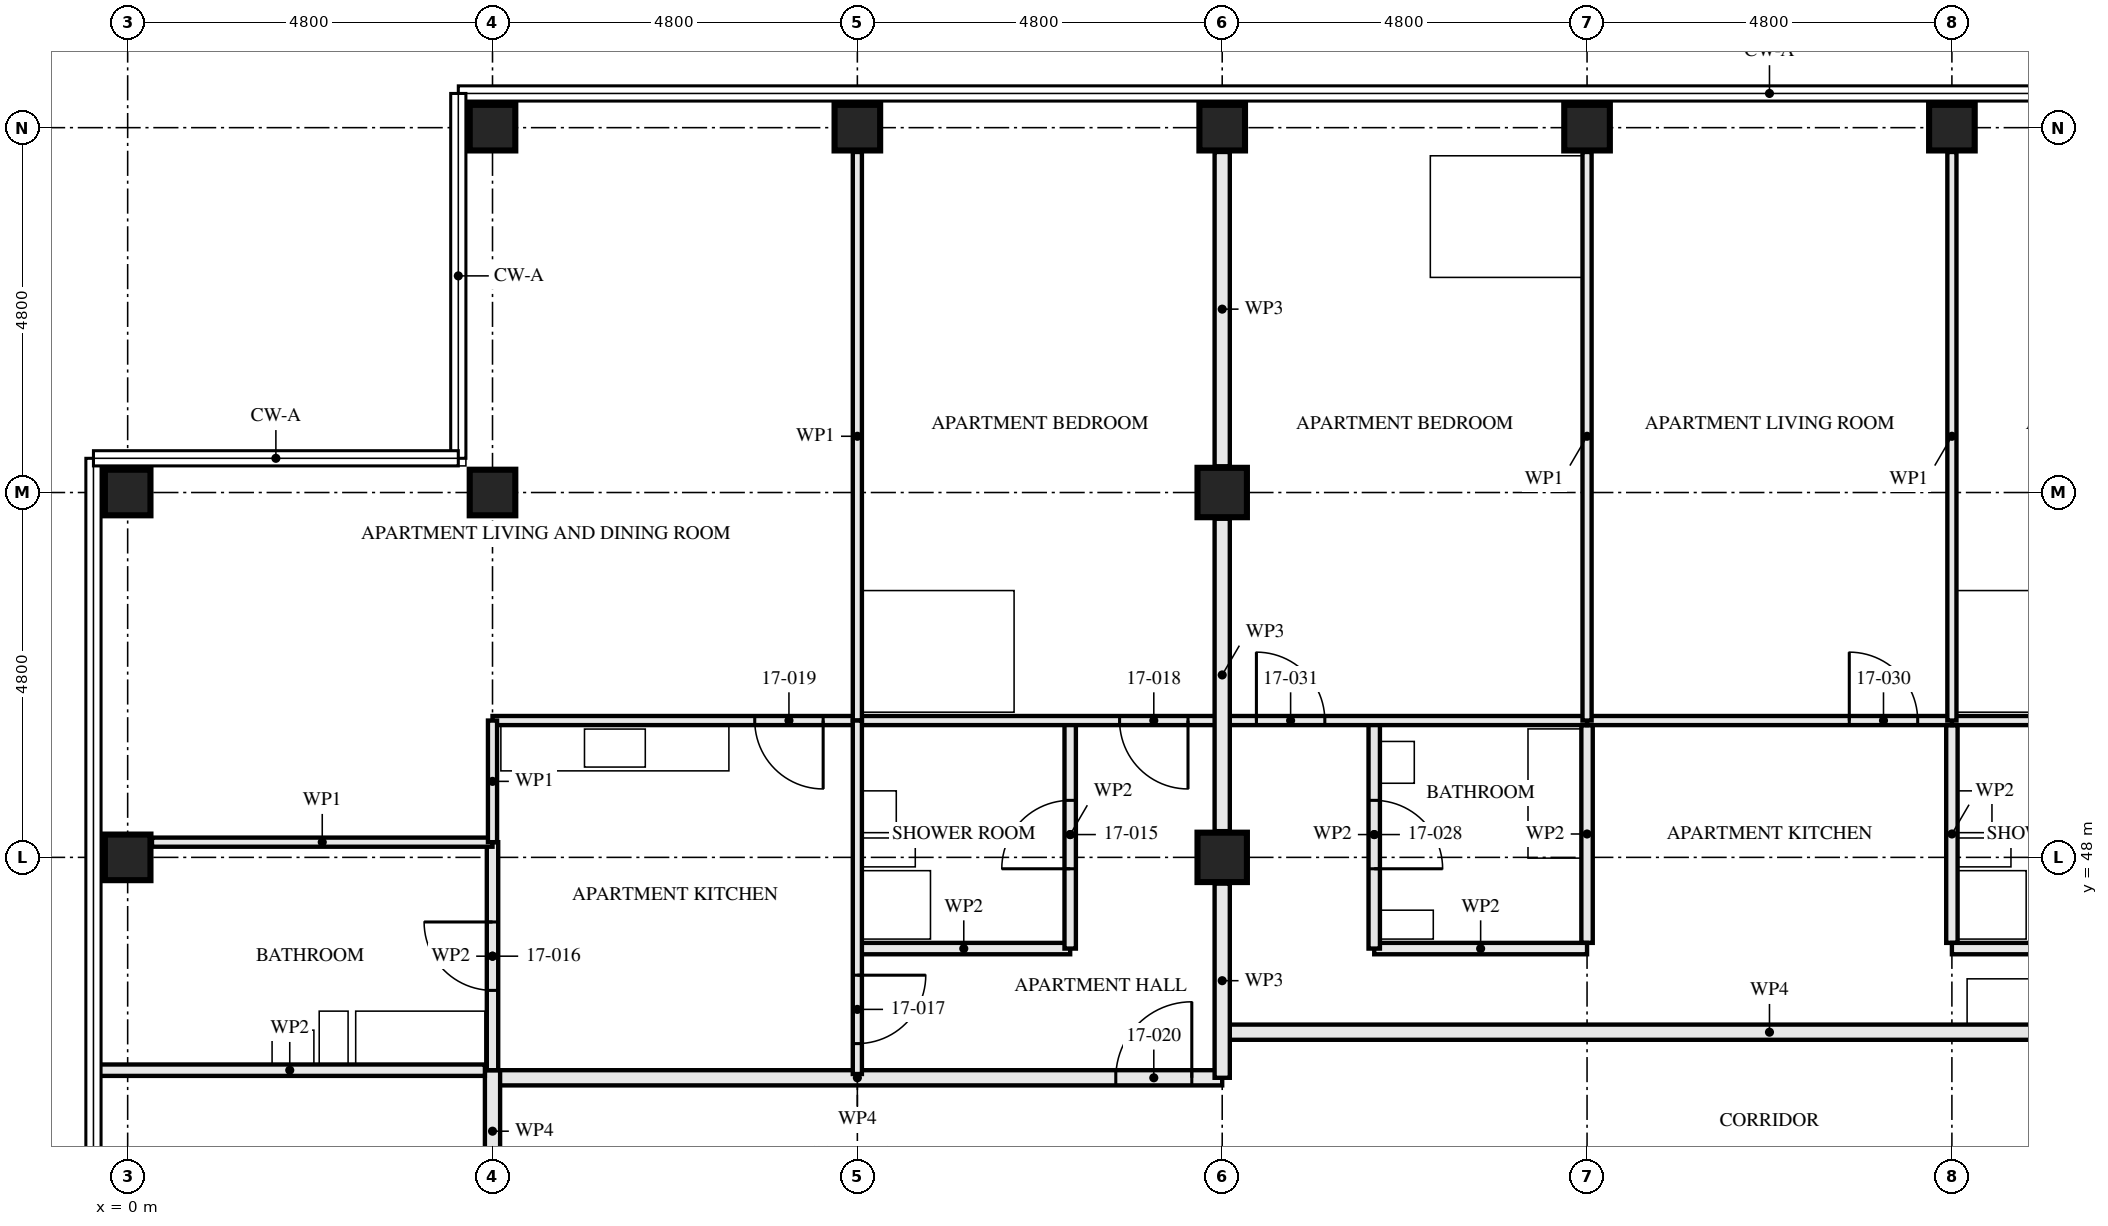
"""IFC4 building model, lengths in metres.
Left out: names, types, materials, properties, quantities, classifications, styles, units other than length and angle.
Written with IfcOpenShell. Run it as: python <this file> out.ifc"""

import sys

from ifc_helpers import new_model, si_unit, direction, frame, frame_2d, origin, origin_2d, place, context, subcontext, project, spatial, rectangle, hollow_rectangle, extrude, element, fill, save


model = new_model("IFC4")
c1 = context("Model", 3, precision=1e-05, world=origin(), true_north=direction((0.0, 1.0)))
c2 = subcontext(c1, "Body", "Model", "MODEL_VIEW")
j1 = project(units=[si_unit("LENGTHUNIT", "METRE"), si_unit("PLANEANGLEUNIT", "RADIAN")], contexts=[c1])
p1 = place(None, origin())
s1 = spatial("IfcSite", under=j1, at=p1, CompositionType="ELEMENT")
p2 = place(p1, origin())
s2 = spatial("IfcBuilding", under=s1, at=p2, CompositionType="ELEMENT")
p3 = place(p2, frame((0.0, 0.0, 65.5)))
s3 = spatial("IfcBuildingStorey", under=s2, at=p3, CompositionType="ELEMENT", Elevation=65.5)
for number, where, z_axis, x_axis in (
    (1, (0.0, 48.0, 0.0), (0.0, 0.0, 1.0), (1.0, 0.0, 0.0)),
    (2, (0.0, 52.8, 0.0), (0.0, 0.0, 1.0), (0.0, 1.0, 0.0)),
    (3, (4.8, 52.8, 0.0), (0.0, 0.0, 1.0), (0.0, 1.0, 0.0)),
    (4, (4.8, 57.6, 0.0), (0.0, 0.0, 1.0), (0.0, 1.0, 0.0)),
    (5, (9.6, 57.6, 0.0), (0.0, 0.0, 1.0), (0.0, 1.0, 0.0)),
):
    element("IfcColumn", number, at=place(p3, frame(where, z_axis=z_axis, x_axis=x_axis)), inside=s3, PredefinedType="COLUMN", context=c2, shape_type="SweptSolid", body=[
        extrude(hollow_rectangle(XDim=0.6, YDim=0.6, WallThickness=0.08, at=origin_2d()), origin(), (0.0, 0.0, 1.0), 3.5),
    ])
for number, where, z_axis, x_axis in (
    (6, (14.4, 48.0, 0.0), (0.0, 0.0, 1.0), (1.0, 0.0, 0.0)),
    (7, (14.4, 52.8, 0.0), (0.0, 0.0, 1.0), (1.0, 0.0, 0.0)),
):
    element("IfcColumn", number, at=place(p3, frame(where, z_axis=z_axis, x_axis=x_axis)), inside=s3, PredefinedType="COLUMN", context=c2, shape_type="SweptSolid", body=[
        extrude(hollow_rectangle(XDim=0.65, YDim=0.65, WallThickness=0.05, at=origin_2d()), origin(), (0.0, 0.0, 1.0), 3.5),
    ])
for number, where, z_axis, x_axis in (
    (8, (14.4, 57.6, 0.0), (0.0, 0.0, 1.0), (0.0, 1.0, 0.0)),
    (9, (19.2, 57.6, 0.0), (0.0, 0.0, 1.0), (0.0, 1.0, 0.0)),
    (10, (24.0, 57.6, 0.0), (0.0, 0.0, 1.0), (0.0, 1.0, 0.0)),
):
    element("IfcColumn", number, at=place(p3, frame(where, z_axis=z_axis, x_axis=x_axis)), inside=s3, PredefinedType="COLUMN", context=c2, shape_type="SweptSolid", body=[
        extrude(hollow_rectangle(XDim=0.6, YDim=0.6, WallThickness=0.08, at=origin_2d()), origin(), (0.0, 0.0, 1.0), 3.5),
    ])
p4 = place(p3, frame((12.4, 49.8, 0.0), z_axis=(0.0, 0.0, 1.0), x_axis=(0.0, -1.0, 0.0)))
e11 = element("IfcWall", 11, at=p4, inside=s3, PredefinedType="PARTITIONING", context=c2, shape_type="SweptSolid", body=[
    extrude(rectangle(XDim=3.0, YDim=0.15, at=frame_2d((1.5, 0.0))), origin(), (0.0, 0.0, 1.0), 2.55),
])
p5 = place(p4, frame((1.05, 0.0, 0.0)))
e12 = element("IfcOpeningElement", 12, at=p5, cuts=e11, PredefinedType="OPENING", context=c2, shape_type="SweptSolid", body=[
    extrude(rectangle(XDim=0.9, YDim=2.1, at=frame_2d((0.45, 1.05))), frame((0.0, 0.085, 0.0), z_axis=(0.0, -1.0, 0.0), x_axis=(1.0, 0.0, 0.0)), (0.0, 0.0, 1.0), 0.171),
])
p6 = place(p3, frame((12.4, 46.8, 0.0), z_axis=(0.0, 0.0, 1.0), x_axis=(-1.0, 0.0, 0.0)))
e13 = element("IfcWall", 13, at=p6, inside=s3, PredefinedType="PARTITIONING", context=c2, shape_type="SweptSolid", body=[
    extrude(rectangle(XDim=2.8, YDim=0.15, at=frame_2d((1.4, 0.0))), origin(), (0.0, 0.0, 1.0), 3.33),
])
p7 = place(p3, frame((4.8, 48.2, 0.0), z_axis=(0.0, 0.0, 1.0), x_axis=(0.0, -1.0, 0.0)))
e14 = element("IfcWall", 14, at=p7, inside=s3, PredefinedType="PARTITIONING", context=c2, shape_type="SweptSolid", body=[
    extrude(rectangle(XDim=3.0, YDim=0.15, at=frame_2d((1.5, 0.0))), origin(), (0.0, 0.0, 1.0), 2.55),
])
p8 = place(p7, frame((1.05, 0.0, 0.0)))
e15 = element("IfcOpeningElement", 15, at=p8, cuts=e14, PredefinedType="OPENING", context=c2, shape_type="SweptSolid", body=[
    extrude(rectangle(XDim=0.9, YDim=2.1, at=frame_2d((0.45, 1.05))), frame((0.0, 0.085, 0.0), z_axis=(0.0, -1.0, 0.0), x_axis=(1.0, 0.0, 0.0)), (0.0, 0.0, 1.0), 0.171),
])
p9 = place(p3, frame((9.6, 49.8, 0.0), z_axis=(0.0, 0.0, 1.0), x_axis=(0.0, -1.0, 0.0)))
e16 = element("IfcWall", 16, at=p9, inside=s3, PredefinedType="PARTITIONING", context=c2, shape_type="SweptSolid", body=[
    extrude(rectangle(XDim=4.65, YDim=0.12, at=frame_2d((2.325, 0.0))), origin(), (0.0, 0.0, 1.0), 2.55),
])
p10 = place(p9, frame((3.35, 0.0, 0.0)))
e17 = element("IfcOpeningElement", 17, at=p10, cuts=e16, PredefinedType="OPENING", context=c2, shape_type="SweptSolid", body=[
    extrude(rectangle(XDim=0.9, YDim=2.1, at=frame_2d((0.45, 1.05))), frame((0.0, 0.071, 0.0), z_axis=(0.0, -1.0, 0.0), x_axis=(1.0, 0.0, 0.0)), (0.0, 0.0, 1.0), 0.141),
])
p11 = place(p3, frame((14.4, 49.8, 0.0), z_axis=(0.0, 0.0, 1.0), x_axis=(-1.0, 0.0, 0.0)))
e18 = element("IfcWall", 18, at=p11, inside=s3, PredefinedType="PARTITIONING", context=c2, shape_type="SweptSolid", body=[
    extrude(rectangle(XDim=4.8, YDim=0.12, at=frame_2d((2.4, 0.0))), origin(), (0.0, 0.0, 1.0), 3.33),
])
p12 = place(p11, frame((0.45, 0.0, 0.0)))
e19 = element("IfcOpeningElement", 19, at=p12, cuts=e18, PredefinedType="OPENING", context=c2, shape_type="SweptSolid", body=[
    extrude(rectangle(XDim=0.9, YDim=2.1, at=frame_2d((0.45, 1.05))), frame((0.0, 0.071, 0.0), z_axis=(0.0, -1.0, 0.0), x_axis=(1.0, 0.0, 0.0)), (0.0, 0.0, 1.0), 0.141),
])
p13 = place(p3, frame((9.6, 49.8, 0.0), z_axis=(0.0, 0.0, 1.0), x_axis=(-1.0, 0.0, 0.0)))
e20 = element("IfcWall", 20, at=p13, inside=s3, PredefinedType="PARTITIONING", context=c2, shape_type="SweptSolid", body=[
    extrude(rectangle(XDim=4.8, YDim=0.12, at=frame_2d((2.4, 0.0))), origin(), (0.0, 0.0, 1.0), 3.33),
])
p14 = place(p13, frame((0.45, 0.0, 0.0)))
e21 = element("IfcOpeningElement", 21, at=p14, cuts=e20, PredefinedType="OPENING", context=c2, shape_type="SweptSolid", body=[
    extrude(rectangle(XDim=0.9, YDim=2.1, at=frame_2d((0.45, 1.05))), frame((0.0, 0.071, 0.0), z_axis=(0.0, -1.0, 0.0), x_axis=(1.0, 0.0, 0.0)), (0.0, 0.0, 1.0), 0.141),
])
p15 = place(p3, frame((4.8, 48.2, 0.0), z_axis=(0.0, 0.0, 1.0), x_axis=(-1.0, 0.0, 0.0)))
e22 = element("IfcWall", 22, at=p15, inside=s3, PredefinedType="PARTITIONING", context=c2, shape_type="SweptSolid", body=[
    extrude(rectangle(XDim=4.48, YDim=0.12, at=frame_2d((2.24, 0.0))), origin(), (0.0, 0.0, 1.0), 3.33),
])
p16 = place(p3, frame((9.6, 57.28, 0.0), z_axis=(0.0, 0.0, 1.0), x_axis=(0.0, -1.0, 0.0)))
e23 = element("IfcWall", 23, at=p16, inside=s3, PredefinedType="PARTITIONING", context=c2, shape_type="SweptSolid", body=[
    extrude(rectangle(XDim=7.48, YDim=0.12, at=frame_2d((3.74, 0.0))), origin(), (0.0, 0.0, 1.0), 2.55),
])
p17 = place(p3, frame((4.8, 49.8, 0.0), z_axis=(0.0, 0.0, 1.0), x_axis=(0.0, -1.0, 0.0)))
e24 = element("IfcWall", 24, at=p17, inside=s3, PredefinedType="PARTITIONING", context=c2, shape_type="SweptSolid", body=[
    extrude(rectangle(XDim=1.6, YDim=0.12, at=frame_2d((0.8, 0.0))), origin(), (0.0, 0.0, 1.0), 3.33),
])
p18 = place(p3, frame((14.4, 45.1, 0.0), z_axis=(0.0, 0.0, 1.0), x_axis=(-1.0, 0.0, 0.0)))
e25 = element("IfcWall", 25, at=p18, inside=s3, PredefinedType="PARTITIONING", context=c2, shape_type="SweptSolid", body=[
    extrude(rectangle(XDim=9.6, YDim=0.2, at=frame_2d((4.8, 0.0))), origin(), (0.0, 0.0, 1.0), 3.33),
])
p19 = place(p18, frame((0.4, 0.0, 0.0)))
e26 = element("IfcOpeningElement", 26, at=p19, cuts=e25, PredefinedType="OPENING", context=c2, shape_type="SweptSolid", body=[
    extrude(rectangle(XDim=1.0, YDim=2.1, at=frame_2d((0.5, 1.05))), frame((0.0, 0.111, 0.0), z_axis=(0.0, -1.0, 0.0), x_axis=(1.0, 0.0, 0.0)), (0.0, 0.0, 1.0), 0.221),
])
p20 = place(p3, frame((4.8, 45.2, 0.0), z_axis=(0.0, 0.0, 1.0), x_axis=(0.0, -1.0, 0.0)))
e27 = element("IfcWall", 27, at=p20, inside=s3, PredefinedType="PARTITIONING", context=c2, shape_type="SweptSolid", body=[
    extrude(rectangle(XDim=1.605, YDim=0.2, at=frame_2d((0.802, 0.0))), origin(), (0.0, 0.0, 1.0), 3.33),
])
p21 = place(p3, frame((26.8, 46.8, 0.0), z_axis=(0.0, 0.0, 1.0), x_axis=(-1.0, 0.0, 0.0)))
e28 = element("IfcWall", 28, at=p21, inside=s3, PredefinedType="PARTITIONING", context=c2, shape_type="SweptSolid", body=[
    extrude(rectangle(XDim=2.8, YDim=0.15, at=frame_2d((1.4, 0.0))), origin(), (0.0, 0.0, 1.0), 3.33),
])
p22 = place(p3, frame((16.4, 49.8, 0.0), z_axis=(0.0, 0.0, 1.0), x_axis=(0.0, -1.0, 0.0)))
e29 = element("IfcWall", 29, at=p22, inside=s3, PredefinedType="PARTITIONING", context=c2, shape_type="SweptSolid", body=[
    extrude(rectangle(XDim=3.0, YDim=0.15, at=frame_2d((1.5, 0.0))), origin(), (0.0, 0.0, 1.0), 2.55),
])
p23 = place(p22, frame((1.05, 0.0, 0.0)))
e30 = element("IfcOpeningElement", 30, at=p23, cuts=e29, PredefinedType="OPENING", context=c2, shape_type="SweptSolid", body=[
    extrude(rectangle(XDim=0.9, YDim=2.1, at=frame_2d((0.45, 1.05))), frame((0.0, 0.085, 0.0), z_axis=(0.0, -1.0, 0.0), x_axis=(1.0, 0.0, 0.0)), (0.0, 0.0, 1.0), 0.171),
])
p24 = place(p3, frame((19.2, 46.8, 0.0), z_axis=(0.0, 0.0, 1.0), x_axis=(-1.0, 0.0, 0.0)))
e31 = element("IfcWall", 31, at=p24, inside=s3, PredefinedType="PARTITIONING", context=c2, shape_type="SweptSolid", body=[
    extrude(rectangle(XDim=2.8, YDim=0.15, at=frame_2d((1.4, 0.0))), origin(), (0.0, 0.0, 1.0), 3.33),
])
p25 = place(p3, frame((28.8, 49.8, 0.0), z_axis=(0.0, 0.0, 1.0), x_axis=(-1.0, 0.0, 0.0)))
e32 = element("IfcWall", 32, at=p25, inside=s3, PredefinedType="PARTITIONING", context=c2, shape_type="SweptSolid", body=[
    extrude(rectangle(XDim=4.8, YDim=0.12, at=frame_2d((2.4, 0.0))), origin(), (0.0, 0.0, 1.0), 3.33),
])
p26 = place(p25, frame((0.45, 0.0, 0.0)))
e33 = element("IfcOpeningElement", 33, at=p26, cuts=e32, PredefinedType="OPENING", context=c2, shape_type="SweptSolid", body=[
    extrude(rectangle(XDim=0.9, YDim=2.1, at=frame_2d((0.45, 1.05))), frame((0.0, 0.071, 0.0), z_axis=(0.0, -1.0, 0.0), x_axis=(1.0, 0.0, 0.0)), (0.0, 0.0, 1.0), 0.141),
])
p27 = place(p3, frame((24.0, 49.8, 0.0), z_axis=(0.0, 0.0, 1.0), x_axis=(-1.0, 0.0, 0.0)))
e34 = element("IfcWall", 34, at=p27, inside=s3, PredefinedType="PARTITIONING", context=c2, shape_type="SweptSolid", body=[
    extrude(rectangle(XDim=4.8, YDim=0.12, at=frame_2d((2.4, 0.0))), origin(), (0.0, 0.0, 1.0), 3.33),
])
p28 = place(p27, frame((0.45, 0.0, 0.0)))
e35 = element("IfcOpeningElement", 35, at=p28, cuts=e34, PredefinedType="OPENING", context=c2, shape_type="SweptSolid", body=[
    extrude(rectangle(XDim=0.9, YDim=2.1, at=frame_2d((0.45, 1.05))), frame((0.0, 0.071, 0.0), z_axis=(0.0, -1.0, 0.0), x_axis=(1.0, 0.0, 0.0)), (0.0, 0.0, 1.0), 0.141),
])
p29 = place(p3, frame((19.2, 49.8, 0.0), z_axis=(0.0, 0.0, 1.0), x_axis=(-1.0, 0.0, 0.0)))
e36 = element("IfcWall", 36, at=p29, inside=s3, PredefinedType="PARTITIONING", context=c2, shape_type="SweptSolid", body=[
    extrude(rectangle(XDim=4.8, YDim=0.12, at=frame_2d((2.4, 0.0))), origin(), (0.0, 0.0, 1.0), 3.33),
])
p30 = place(p29, frame((3.45, 0.0, 0.0)))
e37 = element("IfcOpeningElement", 37, at=p30, cuts=e36, PredefinedType="OPENING", context=c2, shape_type="SweptSolid", body=[
    extrude(rectangle(XDim=0.9, YDim=2.1, at=frame_2d((0.45, 1.05))), frame((0.0, 0.071, 0.0), z_axis=(0.0, -1.0, 0.0), x_axis=(1.0, 0.0, 0.0)), (0.0, 0.0, 1.0), 0.141),
])
for number, where, z_axis, x_axis in (
    (38, (24.0, 57.28, 0.0), (0.0, 0.0, 1.0), (0.0, -1.0, 0.0)),
    (39, (19.2, 57.28, 0.0), (0.0, 0.0, 1.0), (0.0, -1.0, 0.0)),
):
    element("IfcWall", number, at=place(p3, frame(where, z_axis=z_axis, x_axis=x_axis)), inside=s3, PredefinedType="PARTITIONING", context=c2, shape_type="SweptSolid", body=[
        extrude(rectangle(XDim=7.48, YDim=0.12, at=frame_2d((3.74, 0.0))), origin(), (0.0, 0.0, 1.0), 2.55),
    ])
p31 = place(p3, frame((28.8, 45.7, 0.0), z_axis=(0.0, 0.0, 1.0), x_axis=(-1.0, 0.0, 0.0)))
e40 = element("IfcWall", 40, at=p31, inside=s3, PredefinedType="PARTITIONING", context=c2, shape_type="SweptSolid", body=[
    extrude(rectangle(XDim=14.4, YDim=0.2, at=frame_2d((7.2, 0.0))), origin(), (0.0, 0.0, 1.0), 3.33),
])
p32 = place(p31, frame((0.4, 0.0, 0.0)))
e41 = element("IfcOpeningElement", 41, at=p32, cuts=e40, PredefinedType="OPENING", context=c2, shape_type="SweptSolid", body=[
    extrude(rectangle(XDim=1.0, YDim=2.1, at=frame_2d((0.5, 1.05))), frame((0.0, 0.111, 0.0), z_axis=(0.0, -1.0, 0.0), x_axis=(1.0, 0.0, 0.0)), (0.0, 0.0, 1.0), 0.221),
])
p33 = place(p3, frame((14.4, 45.1, 0.0), z_axis=(0.0, 0.0, 1.0), x_axis=(0.0, 1.0, 0.0)))
e42 = element("IfcWall", 42, at=p33, inside=s3, PredefinedType="PARTITIONING", context=c2, shape_type="SweptSolid", body=[
    extrude(rectangle(XDim=2.555, YDim=0.2, at=frame_2d((1.277, 0.0))), origin(), (0.0, 0.0, 1.0), 2.32),
])
p34 = place(p3, frame((14.4, 48.345, 0.0), z_axis=(0.0, 0.0, 1.0), x_axis=(0.0, 1.0, 0.0)))
e43 = element("IfcWall", 43, at=p34, inside=s3, PredefinedType="PARTITIONING", context=c2, shape_type="SweptSolid", body=[
    extrude(rectangle(XDim=4.11, YDim=0.2, at=frame_2d((2.055, 0.0))), origin(), (0.0, 0.0, 1.0), 2.32),
])
p35 = place(p3, frame((14.4, 53.145, 0.0), z_axis=(0.0, 0.0, 1.0), x_axis=(0.0, 1.0, 0.0)))
e44 = element("IfcWall", 44, at=p35, inside=s3, PredefinedType="PARTITIONING", context=c2, shape_type="SweptSolid", body=[
    extrude(rectangle(XDim=4.135, YDim=0.2, at=frame_2d((2.067, 0.0))), origin(), (0.0, 0.0, 1.0), 2.32),
])
p36 = place(p3, frame((4.7, 45.2, 0.0), z_axis=(0.0, 0.0, 1.0), x_axis=(-1.0, 0.0, 0.0)))
e45 = element("IfcWall", 45, at=p36, inside=s3, PredefinedType="PARTITIONING", context=c2, shape_type="SweptSolid", body=[
    extrude(rectangle(XDim=5.135, YDim=0.15, at=frame_2d((2.567, 0.0))), origin(), (0.0, 0.0, 1.0), 2.32),
])
for number, where, z_axis, x_axis in (
    (46, (24.0, 46.875, 0.0), (0.0, 0.0, 1.0), (0.0, 1.0, 0.0)),
    (47, (19.2, 49.74, 0.0), (0.0, 0.0, 1.0), (0.0, -1.0, 0.0)),
):
    element("IfcWall", number, at=place(p3, frame(where, z_axis=z_axis, x_axis=x_axis)), inside=s3, PredefinedType="PARTITIONING", context=c2, shape_type="SweptSolid", body=[
        extrude(rectangle(XDim=2.865, YDim=0.15, at=frame_2d((1.433, 0.0))), origin(), (0.0, 0.0, 1.0), 2.55),
    ])
p37 = place(p5, frame((0.9, 0.0, 0.0), z_axis=(0.0, 0.0, 1.0), x_axis=(-1.0, 0.0, 0.0)))
e48 = element("IfcDoor", 48, at=p37, inside=s3, OperationType="SINGLE_SWING_RIGHT", PredefinedType="DOOR", context=c2, shape_type="SweptSolid", body=[
    extrude(rectangle(XDim=0.9, YDim=2.1, at=frame_2d((0.45, 1.05))), frame((0.0, 0.022, 0.0), z_axis=(0.0, -1.0, 0.0), x_axis=(1.0, 0.0, 0.0)), (0.0, 0.0, 1.0), 0.044),
])
fill(e12, e48)
p38 = place(p8, frame((0.9, 0.0, 0.0), z_axis=(0.0, 0.0, 1.0), x_axis=(-1.0, 0.0, 0.0)))
e49 = element("IfcDoor", 49, at=p38, inside=s3, OperationType="SINGLE_SWING_LEFT", PredefinedType="DOOR", context=c2, shape_type="SweptSolid", body=[
    extrude(rectangle(XDim=0.9, YDim=2.1, at=frame_2d((0.45, 1.05))), frame((0.0, 0.022, 0.0), z_axis=(0.0, -1.0, 0.0), x_axis=(1.0, 0.0, 0.0)), (0.0, 0.0, 1.0), 0.044),
])
fill(e15, e49)
p39 = place(p10, origin())
e50 = element("IfcDoor", 50, at=p39, inside=s3, OperationType="SINGLE_SWING_RIGHT", PredefinedType="DOOR", context=c2, shape_type="SweptSolid", body=[
    extrude(rectangle(XDim=0.9, YDim=2.1, at=frame_2d((0.45, 1.05))), frame((0.0, 0.022, 0.0), z_axis=(0.0, -1.0, 0.0), x_axis=(1.0, 0.0, 0.0)), (0.0, 0.0, 1.0), 0.044),
])
fill(e17, e50)
p40 = place(p12, origin())
e51 = element("IfcDoor", 51, at=p40, inside=s3, OperationType="SINGLE_SWING_RIGHT", PredefinedType="DOOR", context=c2, shape_type="SweptSolid", body=[
    extrude(rectangle(XDim=0.9, YDim=2.1, at=frame_2d((0.45, 1.05))), frame((0.0, 0.022, 0.0), z_axis=(0.0, -1.0, 0.0), x_axis=(1.0, 0.0, 0.0)), (0.0, 0.0, 1.0), 0.044),
])
fill(e19, e51)
p41 = place(p14, origin())
e52 = element("IfcDoor", 52, at=p41, inside=s3, OperationType="SINGLE_SWING_RIGHT", PredefinedType="DOOR", context=c2, shape_type="SweptSolid", body=[
    extrude(rectangle(XDim=0.9, YDim=2.1, at=frame_2d((0.45, 1.05))), frame((0.0, 0.022, 0.0), z_axis=(0.0, -1.0, 0.0), x_axis=(1.0, 0.0, 0.0)), (0.0, 0.0, 1.0), 0.044),
])
fill(e21, e52)
p42 = place(p19, frame((1.0, 0.0, 0.0), z_axis=(0.0, 0.0, 1.0), x_axis=(-1.0, 0.0, 0.0)))
e53 = element("IfcDoor", 53, at=p42, inside=s3, OperationType="SINGLE_SWING_LEFT", PredefinedType="DOOR", context=c2, shape_type="SweptSolid", body=[
    extrude(rectangle(XDim=1.0, YDim=2.1, at=frame_2d((0.5, 1.05))), frame((0.0, 0.027, 0.0), z_axis=(0.0, -1.0, 0.0), x_axis=(1.0, 0.0, 0.0)), (0.0, 0.0, 1.0), 0.054),
])
fill(e26, e53)
p43 = place(p23, origin())
e54 = element("IfcDoor", 54, at=p43, inside=s3, OperationType="SINGLE_SWING_LEFT", PredefinedType="DOOR", context=c2, shape_type="SweptSolid", body=[
    extrude(rectangle(XDim=0.9, YDim=2.1, at=frame_2d((0.45, 1.05))), frame((0.0, 0.022, 0.0), z_axis=(0.0, -1.0, 0.0), x_axis=(1.0, 0.0, 0.0)), (0.0, 0.0, 1.0), 0.044),
])
fill(e30, e54)
p44 = place(p28, frame((0.9, 0.0, 0.0), z_axis=(0.0, 0.0, 1.0), x_axis=(-1.0, 0.0, 0.0)))
e55 = element("IfcDoor", 55, at=p44, inside=s3, OperationType="SINGLE_SWING_RIGHT", PredefinedType="DOOR", context=c2, shape_type="SweptSolid", body=[
    extrude(rectangle(XDim=0.9, YDim=2.1, at=frame_2d((0.45, 1.05))), frame((0.0, 0.022, 0.0), z_axis=(0.0, -1.0, 0.0), x_axis=(1.0, 0.0, 0.0)), (0.0, 0.0, 1.0), 0.044),
])
fill(e35, e55)
p45 = place(p30, frame((0.9, 0.0, 0.0), z_axis=(0.0, 0.0, 1.0), x_axis=(-1.0, 0.0, 0.0)))
e56 = element("IfcDoor", 56, at=p45, inside=s3, OperationType="SINGLE_SWING_RIGHT", PredefinedType="DOOR", context=c2, shape_type="SweptSolid", body=[
    extrude(rectangle(XDim=0.9, YDim=2.1, at=frame_2d((0.45, 1.05))), frame((0.0, 0.022, 0.0), z_axis=(0.0, -1.0, 0.0), x_axis=(1.0, 0.0, 0.0)), (0.0, 0.0, 1.0), 0.044),
])
fill(e37, e56)
save(model, sys.argv[1])
